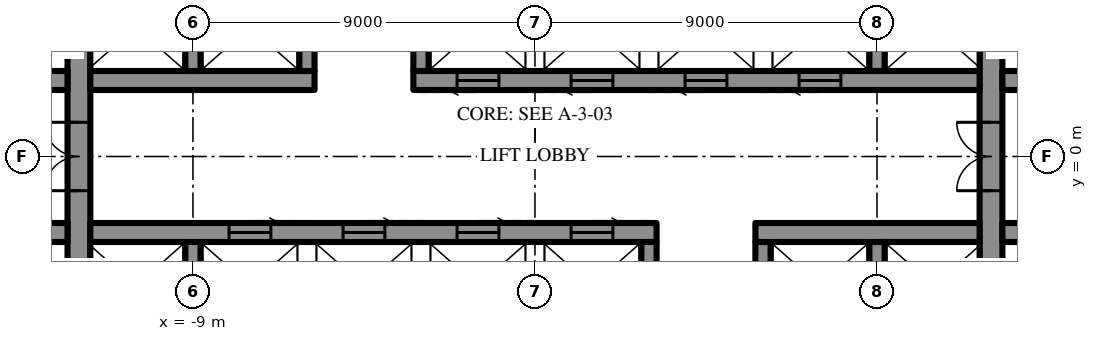
"""IFC4 building model, lengths in metres.
Left out: names, types, materials, properties, quantities, classifications, styles, units other than length and angle.
Written with IfcOpenShell. Run it as: python <this file> out.ifc"""

import sys

from ifc_helpers import new_model, si_unit, direction, frame, frame_2d, origin, place, context, subcontext, project, spatial, rectangle, extrude, element, fill, save


model = new_model("IFC4")
c1 = context("Model", 3, precision=1e-05, world=origin(), true_north=direction((0.0, 1.0)))
c2 = subcontext(c1, "Body", "Model", "MODEL_VIEW")
j1 = project(units=[si_unit("LENGTHUNIT", "METRE"), si_unit("PLANEANGLEUNIT", "RADIAN")], contexts=[c1])
p1 = place(None, origin())
s1 = spatial("IfcSite", under=j1, at=p1, CompositionType="ELEMENT")
p2 = place(p1, origin())
s2 = spatial("IfcBuilding", under=s1, at=p2, CompositionType="ELEMENT")
p3 = place(p2, frame((0.0, 0.0, 236.5)))
s3 = spatial("IfcBuildingStorey", under=s2, at=p3, CompositionType="ELEMENT", Elevation=236.5)
p4 = place(p3, frame((12.0, -10.7, 0.0), z_axis=(0.0, 0.0, 1.0), x_axis=(0.0, 1.0, 0.0)))
e1 = element("IfcWall", 1, at=p4, inside=s3, PredefinedType="SHEAR", context=c2, shape_type="SweptSolid", body=[
    extrude(rectangle(XDim=21.4, YDim=0.6, at=frame_2d((10.7, 0.0))), origin(), (0.0, 0.0, 1.0), 4.2),
])
p5 = place(p4, frame((9.8, 0.0, 0.0)))
e2 = element("IfcOpeningElement", 2, at=p5, cuts=e1, PredefinedType="OPENING", context=c2, shape_type="SweptSolid", body=[
    extrude(rectangle(XDim=1.8, YDim=2.4, at=frame_2d((0.9, 1.2))), frame((0.0, 0.31, 0.0), z_axis=(0.0, -1.0, 0.0), x_axis=(1.0, 0.0, 0.0)), (0.0, 0.0, 1.0), 0.62),
])
p6 = place(p3, frame((-12.0, -10.7, 0.0), z_axis=(0.0, 0.0, 1.0), x_axis=(0.0, 1.0, 0.0)))
e3 = element("IfcWall", 3, at=p6, inside=s3, PredefinedType="SHEAR", context=c2, shape_type="SweptSolid", body=[
    extrude(rectangle(XDim=21.4, YDim=0.6, at=frame_2d((10.7, 0.0))), origin(), (0.0, 0.0, 1.0), 4.2),
])
p7 = place(p6, frame((9.8, 0.0, 0.0)))
e4 = element("IfcOpeningElement", 4, at=p7, cuts=e3, PredefinedType="OPENING", context=c2, shape_type="SweptSolid", body=[
    extrude(rectangle(XDim=1.8, YDim=2.4, at=frame_2d((0.9, 1.2))), frame((0.0, 0.31, 0.0), z_axis=(0.0, -1.0, 0.0), x_axis=(1.0, 0.0, 0.0)), (0.0, 0.0, 1.0), 0.62),
])
p8 = place(p3, frame((-14.5, 2.0, 0.0), z_axis=(0.0, 0.0, 1.0), x_axis=(1.0, 0.0, 0.0)))
e5 = element("IfcWall", 5, at=p8, inside=s3, PredefinedType="SHEAR", context=c2, shape_type="SweptSolid", body=[
    extrude(rectangle(XDim=2.2, YDim=0.5, at=frame_2d((1.1, 0.0))), origin(), (0.0, 0.0, 1.0), 4.2),
])
p9 = place(p8, frame((0.5, 0.0, 0.0)))
e6 = element("IfcOpeningElement", 6, at=p9, cuts=e5, PredefinedType="OPENING", context=c2, shape_type="SweptSolid", body=[
    extrude(rectangle(XDim=0.9, YDim=2.2, at=frame_2d((0.45, 1.1))), frame((0.0, 0.26, 0.0), z_axis=(0.0, -1.0, 0.0), x_axis=(1.0, 0.0, 0.0)), (0.0, 0.0, 1.0), 0.52),
])
p10 = place(p3, frame((-11.7, 2.0, 0.0), z_axis=(0.0, 0.0, 1.0), x_axis=(1.0, 0.0, 0.0)))
e7 = element("IfcWall", 7, at=p10, inside=s3, PredefinedType="SHEAR", context=c2, shape_type="SweptSolid", body=[
    extrude(rectangle(XDim=5.9, YDim=0.5, at=frame_2d((2.95, 0.0))), origin(), (0.0, 0.0, 1.0), 4.2),
])
p11 = place(p3, frame((-3.2, 2.0, 0.0), z_axis=(0.0, 0.0, 1.0), x_axis=(1.0, 0.0, 0.0)))
e8 = element("IfcWall", 8, at=p11, inside=s3, PredefinedType="SHEAR", context=c2, shape_type="SweptSolid", body=[
    extrude(rectangle(XDim=14.9, YDim=0.5, at=frame_2d((7.45, 0.0))), origin(), (0.0, 0.0, 1.0), 4.2),
])
p12 = place(p11, frame((1.15, 0.0, 0.0)))
e9 = element("IfcOpeningElement", 9, at=p12, cuts=e8, PredefinedType="OPENING", context=c2, shape_type="SweptSolid", body=[
    extrude(rectangle(XDim=1.1, YDim=2.2, at=frame_2d((0.55, 1.1))), frame((0.0, 0.26, 0.0), z_axis=(0.0, -1.0, 0.0), x_axis=(1.0, 0.0, 0.0)), (0.0, 0.0, 1.0), 0.52),
])
p13 = place(p11, frame((4.15, 0.0, 0.0)))
e10 = element("IfcOpeningElement", 10, at=p13, cuts=e8, PredefinedType="OPENING", context=c2, shape_type="SweptSolid", body=[
    extrude(rectangle(XDim=1.1, YDim=2.2, at=frame_2d((0.55, 1.1))), frame((0.0, 0.26, 0.0), z_axis=(0.0, -1.0, 0.0), x_axis=(1.0, 0.0, 0.0)), (0.0, 0.0, 1.0), 0.52),
])
p14 = place(p11, frame((7.15, 0.0, 0.0)))
e11 = element("IfcOpeningElement", 11, at=p14, cuts=e8, PredefinedType="OPENING", context=c2, shape_type="SweptSolid", body=[
    extrude(rectangle(XDim=1.1, YDim=2.2, at=frame_2d((0.55, 1.1))), frame((0.0, 0.26, 0.0), z_axis=(0.0, -1.0, 0.0), x_axis=(1.0, 0.0, 0.0)), (0.0, 0.0, 1.0), 0.52),
])
p15 = place(p11, frame((10.15, 0.0, 0.0)))
e12 = element("IfcOpeningElement", 12, at=p15, cuts=e8, PredefinedType="OPENING", context=c2, shape_type="SweptSolid", body=[
    extrude(rectangle(XDim=1.1, YDim=2.2, at=frame_2d((0.55, 1.1))), frame((0.0, 0.26, 0.0), z_axis=(0.0, -1.0, 0.0), x_axis=(1.0, 0.0, 0.0)), (0.0, 0.0, 1.0), 0.52),
])
p16 = place(p3, frame((12.3, 2.0, 0.0), z_axis=(0.0, 0.0, 1.0), x_axis=(1.0, 0.0, 0.0)))
e13 = element("IfcWall", 13, at=p16, inside=s3, PredefinedType="SHEAR", context=c2, shape_type="SweptSolid", body=[
    extrude(rectangle(XDim=2.2, YDim=0.5, at=frame_2d((1.1, 0.0))), origin(), (0.0, 0.0, 1.0), 4.2),
])
p17 = place(p16, frame((0.8, 0.0, 0.0)))
e14 = element("IfcOpeningElement", 14, at=p17, cuts=e13, PredefinedType="OPENING", context=c2, shape_type="SweptSolid", body=[
    extrude(rectangle(XDim=0.9, YDim=2.2, at=frame_2d((0.45, 1.1))), frame((0.0, 0.26, 0.0), z_axis=(0.0, -1.0, 0.0), x_axis=(1.0, 0.0, 0.0)), (0.0, 0.0, 1.0), 0.52),
])
for number, where, z_axis, x_axis in (
    (15, (-9.0, 2.25, 0.0), (0.0, 0.0, 1.0), (0.0, 1.0, 0.0)),
    (16, (-6.0, 2.25, 0.0), (0.0, 0.0, 1.0), (0.0, 1.0, 0.0)),
    (17, (-3.0, 2.25, 0.0), (0.0, 0.0, 1.0), (0.0, 1.0, 0.0)),
    (18, (9.0, 2.25, 0.0), (0.0, 0.0, 1.0), (0.0, 1.0, 0.0)),
):
    element("IfcWall", number, at=place(p3, frame(where, z_axis=z_axis, x_axis=x_axis)), inside=s3, PredefinedType="SHEAR", context=c2, shape_type="SweptSolid", body=[
        extrude(rectangle(XDim=2.3, YDim=0.4, at=frame_2d((1.15, 0.0))), origin(), (0.0, 0.0, 1.0), 4.2),
    ])
p18 = place(p3, frame((14.5, -2.0, 0.0), z_axis=(0.0, 0.0, 1.0), x_axis=(-1.0, 0.0, 0.0)))
e19 = element("IfcWall", 19, at=p18, inside=s3, PredefinedType="SHEAR", context=c2, shape_type="SweptSolid", body=[
    extrude(rectangle(XDim=2.2, YDim=0.5, at=frame_2d((1.1, 0.0))), origin(), (0.0, 0.0, 1.0), 4.2),
])
p19 = place(p18, frame((0.5, 0.0, 0.0)))
e20 = element("IfcOpeningElement", 20, at=p19, cuts=e19, PredefinedType="OPENING", context=c2, shape_type="SweptSolid", body=[
    extrude(rectangle(XDim=0.9, YDim=2.2, at=frame_2d((0.45, 1.1))), frame((0.0, 0.26, 0.0), z_axis=(0.0, -1.0, 0.0), x_axis=(1.0, 0.0, 0.0)), (0.0, 0.0, 1.0), 0.52),
])
p20 = place(p3, frame((11.7, -2.0, 0.0), z_axis=(0.0, 0.0, 1.0), x_axis=(-1.0, 0.0, 0.0)))
e21 = element("IfcWall", 21, at=p20, inside=s3, PredefinedType="SHEAR", context=c2, shape_type="SweptSolid", body=[
    extrude(rectangle(XDim=5.9, YDim=0.5, at=frame_2d((2.95, 0.0))), origin(), (0.0, 0.0, 1.0), 4.2),
])
p21 = place(p3, frame((3.2, -2.0, 0.0), z_axis=(0.0, 0.0, 1.0), x_axis=(-1.0, 0.0, 0.0)))
e22 = element("IfcWall", 22, at=p21, inside=s3, PredefinedType="SHEAR", context=c2, shape_type="SweptSolid", body=[
    extrude(rectangle(XDim=14.9, YDim=0.5, at=frame_2d((7.45, 0.0))), origin(), (0.0, 0.0, 1.0), 4.2),
])
p22 = place(p21, frame((1.15, 0.0, 0.0)))
e23 = element("IfcOpeningElement", 23, at=p22, cuts=e22, PredefinedType="OPENING", context=c2, shape_type="SweptSolid", body=[
    extrude(rectangle(XDim=1.1, YDim=2.2, at=frame_2d((0.55, 1.1))), frame((0.0, 0.26, 0.0), z_axis=(0.0, -1.0, 0.0), x_axis=(1.0, 0.0, 0.0)), (0.0, 0.0, 1.0), 0.52),
])
p23 = place(p21, frame((4.15, 0.0, 0.0)))
e24 = element("IfcOpeningElement", 24, at=p23, cuts=e22, PredefinedType="OPENING", context=c2, shape_type="SweptSolid", body=[
    extrude(rectangle(XDim=1.1, YDim=2.2, at=frame_2d((0.55, 1.1))), frame((0.0, 0.26, 0.0), z_axis=(0.0, -1.0, 0.0), x_axis=(1.0, 0.0, 0.0)), (0.0, 0.0, 1.0), 0.52),
])
p24 = place(p21, frame((7.15, 0.0, 0.0)))
e25 = element("IfcOpeningElement", 25, at=p24, cuts=e22, PredefinedType="OPENING", context=c2, shape_type="SweptSolid", body=[
    extrude(rectangle(XDim=1.1, YDim=2.2, at=frame_2d((0.55, 1.1))), frame((0.0, 0.26, 0.0), z_axis=(0.0, -1.0, 0.0), x_axis=(1.0, 0.0, 0.0)), (0.0, 0.0, 1.0), 0.52),
])
p25 = place(p21, frame((10.15, 0.0, 0.0)))
e26 = element("IfcOpeningElement", 26, at=p25, cuts=e22, PredefinedType="OPENING", context=c2, shape_type="SweptSolid", body=[
    extrude(rectangle(XDim=1.1, YDim=2.2, at=frame_2d((0.55, 1.1))), frame((0.0, 0.26, 0.0), z_axis=(0.0, -1.0, 0.0), x_axis=(1.0, 0.0, 0.0)), (0.0, 0.0, 1.0), 0.52),
])
p26 = place(p3, frame((-12.3, -2.0, 0.0), z_axis=(0.0, 0.0, 1.0), x_axis=(-1.0, 0.0, 0.0)))
e27 = element("IfcWall", 27, at=p26, inside=s3, PredefinedType="SHEAR", context=c2, shape_type="SweptSolid", body=[
    extrude(rectangle(XDim=2.2, YDim=0.5, at=frame_2d((1.1, 0.0))), origin(), (0.0, 0.0, 1.0), 4.2),
])
p27 = place(p26, frame((0.8, 0.0, 0.0)))
e28 = element("IfcOpeningElement", 28, at=p27, cuts=e27, PredefinedType="OPENING", context=c2, shape_type="SweptSolid", body=[
    extrude(rectangle(XDim=0.9, YDim=2.2, at=frame_2d((0.45, 1.1))), frame((0.0, 0.26, 0.0), z_axis=(0.0, -1.0, 0.0), x_axis=(1.0, 0.0, 0.0)), (0.0, 0.0, 1.0), 0.52),
])
for number, where, z_axis, x_axis in (
    (29, (9.0, -2.25, 0.0), (0.0, 0.0, 1.0), (0.0, -1.0, 0.0)),
    (30, (6.0, -2.25, 0.0), (0.0, 0.0, 1.0), (0.0, -1.0, 0.0)),
    (31, (3.0, -2.25, 0.0), (0.0, 0.0, 1.0), (0.0, -1.0, 0.0)),
    (32, (-9.0, -2.25, 0.0), (0.0, 0.0, 1.0), (0.0, -1.0, 0.0)),
):
    element("IfcWall", number, at=place(p3, frame(where, z_axis=z_axis, x_axis=x_axis)), inside=s3, PredefinedType="SHEAR", context=c2, shape_type="SweptSolid", body=[
        extrude(rectangle(XDim=2.3, YDim=0.4, at=frame_2d((1.15, 0.0))), origin(), (0.0, 0.0, 1.0), 4.2),
    ])
p28 = place(p5, origin())
e33 = element("IfcDoor", 33, at=p28, inside=s3, OperationType="DOUBLE_DOOR_SINGLE_SWING", PredefinedType="DOOR", context=c2, shape_type="SweptSolid", body=[
    extrude(rectangle(XDim=1.8, YDim=2.4, at=frame_2d((0.9, 1.2))), frame((0.0, 0.025, 0.0), z_axis=(0.0, -1.0, 0.0), x_axis=(1.0, 0.0, 0.0)), (0.0, 0.0, 1.0), 0.05),
])
fill(e2, e33)
p29 = place(p7, origin())
e34 = element("IfcDoor", 34, at=p29, inside=s3, OperationType="DOUBLE_DOOR_SINGLE_SWING", PredefinedType="DOOR", context=c2, shape_type="SweptSolid", body=[
    extrude(rectangle(XDim=1.8, YDim=2.4, at=frame_2d((0.9, 1.2))), frame((0.0, 0.025, 0.0), z_axis=(0.0, -1.0, 0.0), x_axis=(1.0, 0.0, 0.0)), (0.0, 0.0, 1.0), 0.05),
])
fill(e4, e34)
p30 = place(p12, frame((1.1, 0.0, 0.0), z_axis=(0.0, 0.0, 1.0), x_axis=(-1.0, 0.0, 0.0)))
e35 = element("IfcDoor", 35, at=p30, inside=s3, OperationType="SLIDING_TO_LEFT", PredefinedType="DOOR", context=c2, shape_type="SweptSolid", body=[
    extrude(rectangle(XDim=1.1, YDim=2.2, at=frame_2d((0.55, 1.1))), frame((0.0, 0.025, 0.0), z_axis=(0.0, -1.0, 0.0), x_axis=(1.0, 0.0, 0.0)), (0.0, 0.0, 1.0), 0.05),
])
fill(e9, e35)
p31 = place(p13, frame((1.1, 0.0, 0.0), z_axis=(0.0, 0.0, 1.0), x_axis=(-1.0, 0.0, 0.0)))
e36 = element("IfcDoor", 36, at=p31, inside=s3, OperationType="SLIDING_TO_LEFT", PredefinedType="DOOR", context=c2, shape_type="SweptSolid", body=[
    extrude(rectangle(XDim=1.1, YDim=2.2, at=frame_2d((0.55, 1.1))), frame((0.0, 0.025, 0.0), z_axis=(0.0, -1.0, 0.0), x_axis=(1.0, 0.0, 0.0)), (0.0, 0.0, 1.0), 0.05),
])
fill(e10, e36)
p32 = place(p14, frame((1.1, 0.0, 0.0), z_axis=(0.0, 0.0, 1.0), x_axis=(-1.0, 0.0, 0.0)))
e37 = element("IfcDoor", 37, at=p32, inside=s3, OperationType="SLIDING_TO_LEFT", PredefinedType="DOOR", context=c2, shape_type="SweptSolid", body=[
    extrude(rectangle(XDim=1.1, YDim=2.2, at=frame_2d((0.55, 1.1))), frame((0.0, 0.025, 0.0), z_axis=(0.0, -1.0, 0.0), x_axis=(1.0, 0.0, 0.0)), (0.0, 0.0, 1.0), 0.05),
])
fill(e11, e37)
p33 = place(p15, frame((1.1, 0.0, 0.0), z_axis=(0.0, 0.0, 1.0), x_axis=(-1.0, 0.0, 0.0)))
e38 = element("IfcDoor", 38, at=p33, inside=s3, OperationType="SLIDING_TO_LEFT", PredefinedType="DOOR", context=c2, shape_type="SweptSolid", body=[
    extrude(rectangle(XDim=1.1, YDim=2.2, at=frame_2d((0.55, 1.1))), frame((0.0, 0.025, 0.0), z_axis=(0.0, -1.0, 0.0), x_axis=(1.0, 0.0, 0.0)), (0.0, 0.0, 1.0), 0.05),
])
fill(e12, e38)
p34 = place(p22, frame((1.1, 0.0, 0.0), z_axis=(0.0, 0.0, 1.0), x_axis=(-1.0, 0.0, 0.0)))
e39 = element("IfcDoor", 39, at=p34, inside=s3, OperationType="SLIDING_TO_LEFT", PredefinedType="DOOR", context=c2, shape_type="SweptSolid", body=[
    extrude(rectangle(XDim=1.1, YDim=2.2, at=frame_2d((0.55, 1.1))), frame((0.0, 0.025, 0.0), z_axis=(0.0, -1.0, 0.0), x_axis=(1.0, 0.0, 0.0)), (0.0, 0.0, 1.0), 0.05),
])
fill(e23, e39)
p35 = place(p23, frame((1.1, 0.0, 0.0), z_axis=(0.0, 0.0, 1.0), x_axis=(-1.0, 0.0, 0.0)))
e40 = element("IfcDoor", 40, at=p35, inside=s3, OperationType="SLIDING_TO_LEFT", PredefinedType="DOOR", context=c2, shape_type="SweptSolid", body=[
    extrude(rectangle(XDim=1.1, YDim=2.2, at=frame_2d((0.55, 1.1))), frame((0.0, 0.025, 0.0), z_axis=(0.0, -1.0, 0.0), x_axis=(1.0, 0.0, 0.0)), (0.0, 0.0, 1.0), 0.05),
])
fill(e24, e40)
p36 = place(p24, frame((1.1, 0.0, 0.0), z_axis=(0.0, 0.0, 1.0), x_axis=(-1.0, 0.0, 0.0)))
e41 = element("IfcDoor", 41, at=p36, inside=s3, OperationType="SLIDING_TO_LEFT", PredefinedType="DOOR", context=c2, shape_type="SweptSolid", body=[
    extrude(rectangle(XDim=1.1, YDim=2.2, at=frame_2d((0.55, 1.1))), frame((0.0, 0.025, 0.0), z_axis=(0.0, -1.0, 0.0), x_axis=(1.0, 0.0, 0.0)), (0.0, 0.0, 1.0), 0.05),
])
fill(e25, e41)
p37 = place(p25, frame((1.1, 0.0, 0.0), z_axis=(0.0, 0.0, 1.0), x_axis=(-1.0, 0.0, 0.0)))
e42 = element("IfcDoor", 42, at=p37, inside=s3, OperationType="SLIDING_TO_LEFT", PredefinedType="DOOR", context=c2, shape_type="SweptSolid", body=[
    extrude(rectangle(XDim=1.1, YDim=2.2, at=frame_2d((0.55, 1.1))), frame((0.0, 0.025, 0.0), z_axis=(0.0, -1.0, 0.0), x_axis=(1.0, 0.0, 0.0)), (0.0, 0.0, 1.0), 0.05),
])
fill(e26, e42)
save(model, sys.argv[1])
